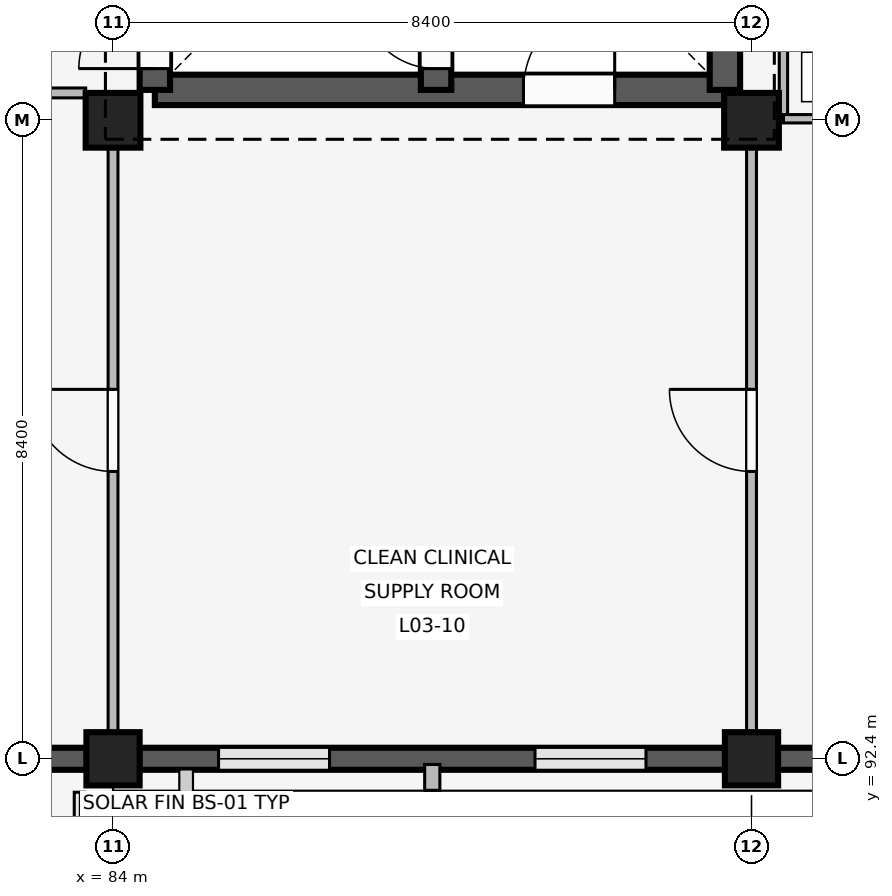
"""IFC4 building model, lengths in metres.
Left out: names, types, materials, properties, quantities, classifications, styles, units other than length and angle.
Written with IfcOpenShell. Run it as: python <this file> out.ifc"""

import sys

from ifc_helpers import new_model, si_unit, direction, frame, frame_2d, origin, origin_2d, place, context, subcontext, project, spatial, rectangle, extrude, element, fill, save


model = new_model("IFC4")
c1 = context("Model", 3, precision=1e-05, world=origin(), true_north=direction((0.0, 1.0)))
c2 = subcontext(c1, "Body", "Model", "MODEL_VIEW")
j1 = project(units=[si_unit("LENGTHUNIT", "METRE"), si_unit("PLANEANGLEUNIT", "RADIAN")], contexts=[c1])
p1 = place(None, origin())
s1 = spatial("IfcSite", under=j1, at=p1, CompositionType="ELEMENT")
p2 = place(p1, origin())
s2 = spatial("IfcBuilding", under=s1, at=p2, CompositionType="ELEMENT")
p3 = place(p2, frame((0.0, 0.0, 12.9)))
s3 = spatial("IfcBuildingStorey", under=s2, at=p3, CompositionType="ELEMENT", Elevation=12.9)
p4 = place(p3, frame((84.0, 92.4, 0.0), z_axis=(0.0, 0.0, 1.0), x_axis=(1.0, 0.0, 0.0)))
e1 = element("IfcColumn", 1, at=p4, inside=s3, PredefinedType="COLUMN", context=c2, shape_type="SweptSolid", body=[
    extrude(rectangle(XDim=0.7, YDim=0.7, at=origin_2d()), origin(), (0.0, 0.0, 1.0), 3.3),
])
p5 = place(p3, frame((84.0, 100.8, 0.0), z_axis=(0.0, 0.0, 1.0), x_axis=(1.0, 0.0, 0.0)))
e2 = element("IfcColumn", 2, at=p5, inside=s3, PredefinedType="COLUMN", context=c2, shape_type="SweptSolid", body=[
    extrude(rectangle(XDim=0.72, YDim=0.72, at=origin_2d()), origin(), (0.0, 0.0, 1.0), 3.3),
])
p6 = place(p3, frame((92.4, 92.4, 0.0), z_axis=(0.0, 0.0, 1.0), x_axis=(1.0, 0.0, 0.0)))
e3 = element("IfcColumn", 3, at=p6, inside=s3, PredefinedType="COLUMN", context=c2, shape_type="SweptSolid", body=[
    extrude(rectangle(XDim=0.7, YDim=0.7, at=origin_2d()), origin(), (0.0, 0.0, 1.0), 3.3),
])
p7 = place(p3, frame((92.4, 100.8, 0.0), z_axis=(0.0, 0.0, 1.0), x_axis=(1.0, 0.0, 0.0)))
e4 = element("IfcColumn", 4, at=p7, inside=s3, PredefinedType="COLUMN", context=c2, shape_type="SweptSolid", body=[
    extrude(rectangle(XDim=0.72, YDim=0.72, at=origin_2d()), origin(), (0.0, 0.0, 1.0), 3.3),
])
p8 = place(p3, frame((83.655, 92.4, 0.0), z_axis=(0.0, 0.0, 1.0), x_axis=(-1.0, 0.0, 0.0)))
e5 = element("IfcWall", 5, at=p8, inside=s3, PredefinedType="SOLIDWALL", context=c2, shape_type="SweptSolid", body=[
    extrude(rectangle(XDim=7.71, YDim=0.29, at=frame_2d((3.855, 0.0))), origin(), (0.0, 0.0, 1.0), 2.44),
])
p9 = place(p8, frame((2.905, 0.0, 0.0)))
e6 = element("IfcOpeningElement", 6, at=p9, cuts=e5, PredefinedType="OPENING", context=c2, shape_type="SweptSolid", body=[
    extrude(rectangle(XDim=1.9, YDim=2.32, at=frame_2d((0.95, 1.16))), frame((0.0, 0.155, 0.0), z_axis=(0.0, -1.0, 0.0), x_axis=(1.0, 0.0, 0.0)), (0.0, 0.0, 1.0), 0.31),
])
p10 = place(p3, frame((92.055, 92.4, 0.0), z_axis=(0.0, 0.0, 1.0), x_axis=(-1.0, 0.0, 0.0)))
e7 = element("IfcWall", 7, at=p10, inside=s3, PredefinedType="SOLIDWALL", context=c2, shape_type="SweptSolid", body=[
    extrude(rectangle(XDim=7.71, YDim=0.29, at=frame_2d((3.855, 0.0))), origin(), (0.0, 0.0, 1.0), 2.44),
])
p11 = place(p10, frame((1.043, 0.0, 0.85)))
e8 = element("IfcOpeningElement", 8, at=p11, cuts=e7, PredefinedType="OPENING", context=c2, shape_type="SweptSolid", body=[
    extrude(rectangle(XDim=1.46, YDim=0.85, at=frame_2d((0.73, 0.425))), frame((0.0, 0.155, 0.0), z_axis=(0.0, -1.0, 0.0), x_axis=(1.0, 0.0, 0.0)), (0.0, 0.0, 1.0), 0.31),
])
p12 = place(p10, frame((5.207, 0.0, 0.85)))
e9 = element("IfcOpeningElement", 9, at=p12, cuts=e7, PredefinedType="OPENING", context=c2, shape_type="SweptSolid", body=[
    extrude(rectangle(XDim=1.46, YDim=0.85, at=frame_2d((0.73, 0.425))), frame((0.0, 0.155, 0.0), z_axis=(0.0, -1.0, 0.0), x_axis=(1.0, 0.0, 0.0)), (0.0, 0.0, 1.0), 0.31),
])
p13 = place(p3, frame((88.2, 92.325, 0.0), z_axis=(0.0, 0.0, 1.0), x_axis=(0.0, -1.0, 0.0)))
e10 = element("IfcWall", 10, at=p13, inside=s3, PredefinedType="ELEMENTEDWALL", context=c2, shape_type="SweptSolid", body=[
    extrude(rectangle(XDim=0.34, YDim=0.2, at=frame_2d((0.17, 0.0))), origin(), (0.0, 0.0, 1.0), 2.42),
])
p14 = place(p3, frame((100.455, 92.4, 0.0), z_axis=(0.0, 0.0, 1.0), x_axis=(-1.0, 0.0, 0.0)))
e11 = element("IfcWall", 11, at=p14, inside=s3, PredefinedType="SOLIDWALL", context=c2, shape_type="SweptSolid", body=[
    extrude(rectangle(XDim=7.71, YDim=0.29, at=frame_2d((3.855, 0.0))), origin(), (0.0, 0.0, 1.0), 2.44),
])
p15 = place(p14, frame((0.963, 0.0, 0.85)))
e12 = element("IfcOpeningElement", 12, at=p15, cuts=e11, PredefinedType="OPENING", context=c2, shape_type="SweptSolid", body=[
    extrude(rectangle(XDim=1.62, YDim=0.95, at=frame_2d((0.81, 0.475))), frame((0.0, 0.155, 0.0), z_axis=(0.0, -1.0, 0.0), x_axis=(1.0, 0.0, 0.0)), (0.0, 0.0, 1.0), 0.31),
])
p16 = place(p14, frame((5.127, 0.0, 0.85)))
e13 = element("IfcOpeningElement", 13, at=p16, cuts=e11, PredefinedType="OPENING", context=c2, shape_type="SweptSolid", body=[
    extrude(rectangle(XDim=1.62, YDim=0.95, at=frame_2d((0.81, 0.475))), frame((0.0, 0.155, 0.0), z_axis=(0.0, -1.0, 0.0), x_axis=(1.0, 0.0, 0.0)), (0.0, 0.0, 1.0), 0.31),
])
p17 = place(p3, frame((84.55, 101.2, 0.0), z_axis=(0.0, 0.0, 1.0), x_axis=(1.0, 0.0, 0.0)))
e14 = element("IfcWall", 14, at=p17, inside=s3, PredefinedType="SHEAR", context=c2, shape_type="SweptSolid", body=[
    extrude(rectangle(XDim=7.5, YDim=0.4, at=frame_2d((3.75, 0.0))), origin(), (0.0, 0.0, 1.0), 3.02),
])
p18 = place(p17, frame((4.85, 0.0, 0.0)))
e15 = element("IfcOpeningElement", 15, at=p18, cuts=e14, PredefinedType="OPENING", context=c2, shape_type="SweptSolid", body=[
    extrude(rectangle(XDim=1.2, YDim=2.2, at=frame_2d((0.6, 1.1))), frame((0.0, 0.21, 0.0), z_axis=(0.0, -1.0, 0.0), x_axis=(1.0, 0.0, 0.0)), (0.0, 0.0, 1.0), 0.42),
])
p19 = place(p3, frame((84.55, 101.2, 0.0), z_axis=(0.0, 0.0, 1.0), x_axis=(0.0, 1.0, 0.0)))
e16 = element("IfcWall", 16, at=p19, inside=s3, PredefinedType="SHEAR", context=c2, shape_type="SweptSolid", body=[
    extrude(rectangle(XDim=7.55, YDim=0.4, at=frame_2d((3.775, 0.0))), origin(), (0.0, 0.0, 1.0), 3.02),
])
p20 = place(p19, frame((0.28, 0.0, 0.0)))
e17 = element("IfcOpeningElement", 17, at=p20, cuts=e16, PredefinedType="OPENING", context=c2, shape_type="SweptSolid", body=[
    extrude(rectangle(XDim=1.0, YDim=2.15, at=frame_2d((0.5, 1.075))), frame((0.0, 0.21, 0.0), z_axis=(0.0, -1.0, 0.0), x_axis=(1.0, 0.0, 0.0)), (0.0, 0.0, 1.0), 0.42),
])
p21 = place(p3, frame((92.05, 101.2, 0.0), z_axis=(0.0, 0.0, 1.0), x_axis=(0.0, 1.0, 0.0)))
e18 = element("IfcWall", 18, at=p21, inside=s3, PredefinedType="SHEAR", context=c2, shape_type="SweptSolid", body=[
    extrude(rectangle(XDim=7.55, YDim=0.4, at=frame_2d((3.775, 0.0))), origin(), (0.0, 0.0, 1.0), 3.02),
])
p22 = place(p21, frame((2.4, 0.0, 0.0)))
e19 = element("IfcOpeningElement", 19, at=p22, cuts=e18, PredefinedType="OPENING", context=c2, shape_type="SweptSolid", body=[
    extrude(rectangle(XDim=1.2, YDim=2.2, at=frame_2d((0.6, 1.1))), frame((0.0, 0.21, 0.0), z_axis=(0.0, -1.0, 0.0), x_axis=(1.0, 0.0, 0.0)), (0.0, 0.0, 1.0), 0.42),
])
p23 = place(p3, frame((88.25, 101.2, 0.0), z_axis=(0.0, 0.0, 1.0), x_axis=(0.0, 1.0, 0.0)))
e20 = element("IfcWall", 20, at=p23, inside=s3, PredefinedType="SHEAR", context=c2, shape_type="SweptSolid", body=[
    extrude(rectangle(XDim=7.55, YDim=0.4, at=frame_2d((3.775, 0.0))), origin(), (0.0, 0.0, 1.0), 3.02),
])
p24 = place(p23, frame((0.28, 0.0, 0.0)))
e21 = element("IfcOpeningElement", 21, at=p24, cuts=e20, PredefinedType="OPENING", context=c2, shape_type="SweptSolid", body=[
    extrude(rectangle(XDim=1.0, YDim=2.15, at=frame_2d((0.5, 1.075))), frame((0.0, 0.21, 0.0), z_axis=(0.0, -1.0, 0.0), x_axis=(1.0, 0.0, 0.0)), (0.0, 0.0, 1.0), 0.42),
])
p25 = place(p3, frame((81.46, 101.16, 0.0), z_axis=(0.0, 0.0, 1.0), x_axis=(1.0, 0.0, 0.0)))
e22 = element("IfcWall", 22, at=p25, inside=s3, PredefinedType="PARTITIONING", context=c2, shape_type="SweptSolid", body=[
    extrude(rectangle(XDim=2.18, YDim=0.13, at=frame_2d((1.09, 0.0))), origin(), (0.0, 0.0, 1.0), 2.42),
])
p26 = place(p3, frame((84.0, 92.54, 0.0), z_axis=(0.0, 0.0, 1.0), x_axis=(0.0, 1.0, 0.0)))
e23 = element("IfcWall", 23, at=p26, inside=s3, PredefinedType="PARTITIONING", context=c2, shape_type="SweptSolid", body=[
    extrude(rectangle(XDim=8.21, YDim=0.13, at=frame_2d((4.105, 0.0))), origin(), (0.0, 0.0, 1.0), 2.42),
])
p27 = place(p26, frame((3.64, 0.0, 0.0)))
e24 = element("IfcOpeningElement", 24, at=p27, cuts=e23, PredefinedType="OPENING", context=c2, shape_type="SweptSolid", body=[
    extrude(rectangle(XDim=1.08, YDim=2.15, at=frame_2d((0.54, 1.075))), frame((0.0, 0.075, 0.0), z_axis=(0.0, -1.0, 0.0), x_axis=(1.0, 0.0, 0.0)), (0.0, 0.0, 1.0), 0.15),
])
p28 = place(p3, frame((92.4, 92.54, 0.0), z_axis=(0.0, 0.0, 1.0), x_axis=(0.0, 1.0, 0.0)))
e25 = element("IfcWall", 25, at=p28, inside=s3, PredefinedType="PARTITIONING", context=c2, shape_type="SweptSolid", body=[
    extrude(rectangle(XDim=8.21, YDim=0.13, at=frame_2d((4.105, 0.0))), origin(), (0.0, 0.0, 1.0), 2.42),
])
p29 = place(p28, frame((3.64, 0.0, 0.0)))
e26 = element("IfcOpeningElement", 26, at=p29, cuts=e25, PredefinedType="OPENING", context=c2, shape_type="SweptSolid", body=[
    extrude(rectangle(XDim=1.08, YDim=2.15, at=frame_2d((0.54, 1.075))), frame((0.0, 0.075, 0.0), z_axis=(0.0, -1.0, 0.0), x_axis=(1.0, 0.0, 0.0)), (0.0, 0.0, 1.0), 0.15),
])
p30 = place(p3, frame((92.82, 100.82, 0.0), z_axis=(0.0, 0.0, 1.0), x_axis=(0.0, 1.0, 0.0)))
e27 = element("IfcWall", 27, at=p30, inside=s3, PredefinedType="PARTITIONING", context=c2, shape_type="SweptSolid", body=[
    extrude(rectangle(XDim=2.61, YDim=0.11, at=frame_2d((1.305, 0.0))), origin(), (0.0, 0.0, 1.0), 2.42),
])
p31 = place(p3, frame((92.82, 100.82, 0.0), z_axis=(0.0, 0.0, 1.0), x_axis=(1.0, 0.0, 0.0)))
e28 = element("IfcWall", 28, at=p31, inside=s3, PredefinedType="PARTITIONING", context=c2, shape_type="SweptSolid", body=[
    extrude(rectangle(XDim=1.98, YDim=0.11, at=frame_2d((0.99, 0.0))), origin(), (0.0, 0.0, 1.0), 2.42),
])
p32 = place(p31, frame((0.54, 0.0, 0.0)))
e29 = element("IfcOpeningElement", 29, at=p32, cuts=e28, PredefinedType="OPENING", context=c2, shape_type="SweptSolid", body=[
    extrude(rectangle(XDim=0.9, YDim=2.1, at=frame_2d((0.45, 1.05))), frame((0.0, 0.065, 0.0), z_axis=(0.0, -1.0, 0.0), x_axis=(1.0, 0.0, 0.0)), (0.0, 0.0, 1.0), 0.13),
])
p33 = place(p11, origin())
e30 = element("IfcWindow", 30, at=p33, inside=s3, PartitioningType="SINGLE_PANEL", PredefinedType="WINDOW", context=c2, shape_type="SweptSolid", body=[
    extrude(rectangle(XDim=1.46, YDim=0.85, at=frame_2d((0.73, 0.425))), frame((0.0, 0.03, 0.0), z_axis=(0.0, -1.0, 0.0), x_axis=(1.0, 0.0, 0.0)), (0.0, 0.0, 1.0), 0.06),
])
fill(e8, e30)
p34 = place(p12, origin())
e31 = element("IfcWindow", 31, at=p34, inside=s3, PartitioningType="SINGLE_PANEL", PredefinedType="WINDOW", context=c2, shape_type="SweptSolid", body=[
    extrude(rectangle(XDim=1.46, YDim=0.85, at=frame_2d((0.73, 0.425))), frame((0.0, 0.03, 0.0), z_axis=(0.0, -1.0, 0.0), x_axis=(1.0, 0.0, 0.0)), (0.0, 0.0, 1.0), 0.06),
])
fill(e9, e31)
p35 = place(p18, origin())
e32 = element("IfcDoor", 32, at=p35, inside=s3, OperationType="SINGLE_SWING_RIGHT", PredefinedType="DOOR", context=c2, shape_type="SweptSolid", body=[
    extrude(rectangle(XDim=1.2, YDim=2.2, at=frame_2d((0.6, 1.1))), frame((0.0, 0.025, 0.0), z_axis=(0.0, -1.0, 0.0), x_axis=(1.0, 0.0, 0.0)), (0.0, 0.0, 1.0), 0.05),
])
fill(e15, e32)
p36 = place(p20, origin())
e33 = element("IfcDoor", 33, at=p36, inside=s3, OperationType="SINGLE_SWING_LEFT", PredefinedType="DOOR", context=c2, shape_type="SweptSolid", body=[
    extrude(rectangle(XDim=1.0, YDim=2.15, at=frame_2d((0.5, 1.075))), frame((0.0, 0.025, 0.0), z_axis=(0.0, -1.0, 0.0), x_axis=(1.0, 0.0, 0.0)), (0.0, 0.0, 1.0), 0.05),
])
fill(e17, e33)
p37 = place(p24, origin())
e34 = element("IfcDoor", 34, at=p37, inside=s3, OperationType="SINGLE_SWING_RIGHT", PredefinedType="DOOR", context=c2, shape_type="SweptSolid", body=[
    extrude(rectangle(XDim=1.0, YDim=2.15, at=frame_2d((0.5, 1.075))), frame((0.0, 0.025, 0.0), z_axis=(0.0, -1.0, 0.0), x_axis=(1.0, 0.0, 0.0)), (0.0, 0.0, 1.0), 0.05),
])
fill(e21, e34)
p38 = place(p27, origin())
e35 = element("IfcDoor", 35, at=p38, inside=s3, OperationType="SINGLE_SWING_RIGHT", PredefinedType="DOOR", context=c2, shape_type="SweptSolid", body=[
    extrude(rectangle(XDim=1.08, YDim=2.15, at=frame_2d((0.54, 1.075))), frame((0.0, 0.025, 0.0), z_axis=(0.0, -1.0, 0.0), x_axis=(1.0, 0.0, 0.0)), (0.0, 0.0, 1.0), 0.05),
])
fill(e24, e35)
p39 = place(p29, origin())
e36 = element("IfcDoor", 36, at=p39, inside=s3, OperationType="SINGLE_SWING_RIGHT", PredefinedType="DOOR", context=c2, shape_type="SweptSolid", body=[
    extrude(rectangle(XDim=1.08, YDim=2.15, at=frame_2d((0.54, 1.075))), frame((0.0, 0.025, 0.0), z_axis=(0.0, -1.0, 0.0), x_axis=(1.0, 0.0, 0.0)), (0.0, 0.0, 1.0), 0.05),
])
fill(e26, e36)
save(model, sys.argv[1])
